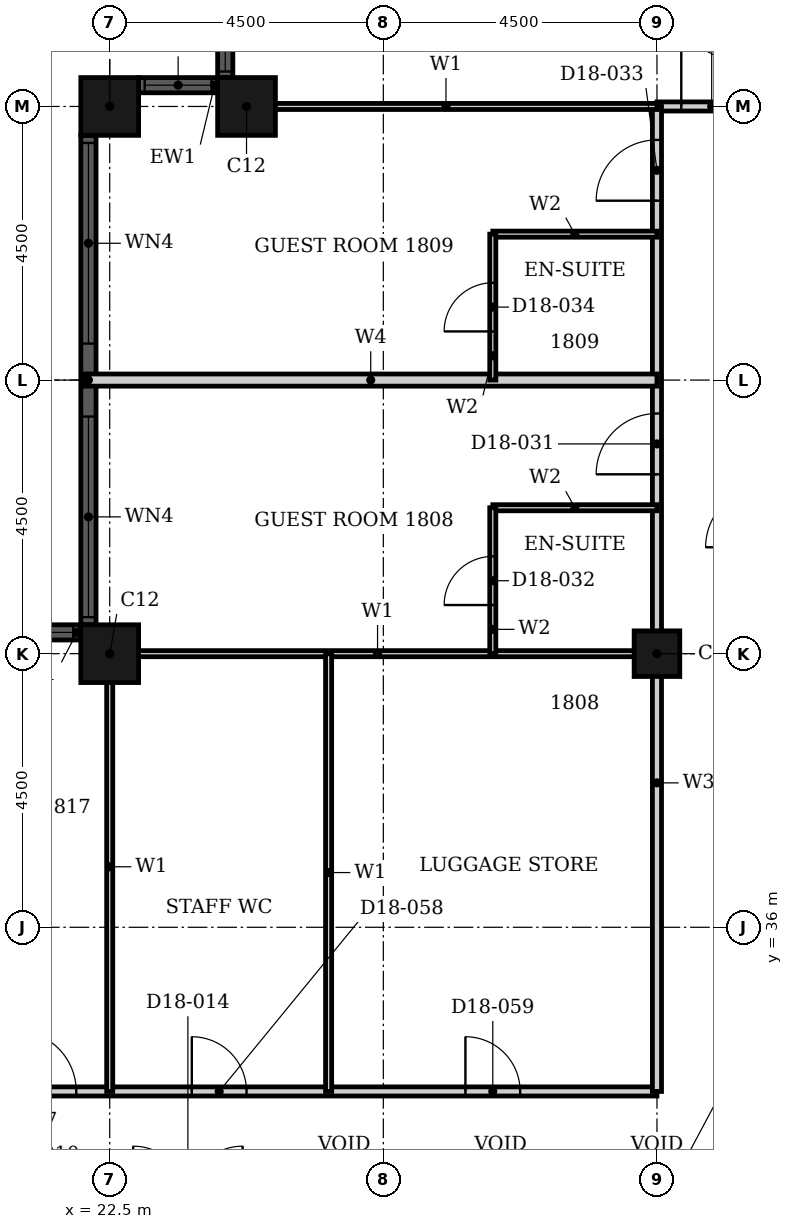
"""IFC4 building model, lengths in metres.
Left out: names, types, materials, properties, quantities, classifications, styles, units other than length and angle.
Written with IfcOpenShell. Run it as: python <this file> out.ifc"""

import sys

from ifc_helpers import new_model, si_unit, direction, frame, frame_2d, origin, origin_2d, place, context, subcontext, project, spatial, rectangle, hollow_rectangle, extrude, element, fill, save


model = new_model("IFC4")
c1 = context("Model", 3, precision=1e-05, world=origin(), true_north=direction((0.0, 1.0)))
c2 = subcontext(c1, "Body", "Model", "MODEL_VIEW")
j1 = project(units=[si_unit("LENGTHUNIT", "METRE"), si_unit("PLANEANGLEUNIT", "RADIAN")], contexts=[c1])
p1 = place(None, origin())
s1 = spatial("IfcSite", under=j1, at=p1, CompositionType="ELEMENT")
p2 = place(p1, origin())
s2 = spatial("IfcBuilding", under=s1, at=p2, CompositionType="ELEMENT")
p3 = place(p2, frame((0.0, 0.0, 78.0)))
s3 = spatial("IfcBuildingStorey", under=s2, at=p3, CompositionType="ELEMENT", Elevation=78.0)
for number, where, z_axis, x_axis in (
    (1, (24.75, 49.5, 0.0), (0.0, 0.0, 1.0), (1.0, 0.0, 0.0)),
    (2, (22.5, 49.5, 0.0), (0.0, 0.0, 1.0), (1.0, 0.0, 0.0)),
    (3, (22.5, 40.5, 0.0), (0.0, 0.0, 1.0), (1.0, 0.0, 0.0)),
):
    element("IfcColumn", number, at=place(p3, frame(where, z_axis=z_axis, x_axis=x_axis)), inside=s3, PredefinedType="COLUMN", context=c2, shape_type="SweptSolid", body=[
        extrude(hollow_rectangle(XDim=0.95, YDim=0.95, WallThickness=0.03, at=origin_2d()), origin(), (0.0, 0.0, 1.0), 3.6),
    ])
p4 = place(p3, frame((31.5, 40.5, 0.0), z_axis=(0.0, 0.0, 1.0), x_axis=(1.0, 0.0, 0.0)))
e4 = element("IfcColumn", 4, at=p4, inside=s3, PredefinedType="COLUMN", context=c2, shape_type="SweptSolid", body=[
    extrude(hollow_rectangle(XDim=0.75, YDim=0.75, WallThickness=0.024, at=origin_2d()), origin(), (0.0, 0.0, 1.0), 3.6),
])
p5 = place(p3, frame((24.4, 51.275, 0.0), z_axis=(0.0, 0.0, 1.0), x_axis=(0.0, -1.0, 0.0)))
e5 = element("IfcWall", 5, at=p5, inside=s3, PredefinedType="SOLIDWALL", context=c2, shape_type="SweptSolid", body=[
    extrude(rectangle(XDim=1.3, YDim=0.25, at=frame_2d((0.65, 0.0))), origin(), (0.0, 0.0, 1.0), 3.6),
])
p6 = place(p5, frame((0.1, 0.0, 0.9)))
e6 = element("IfcOpeningElement", 6, at=p6, cuts=e5, PredefinedType="OPENING", context=c2, shape_type="SweptSolid", body=[
    extrude(rectangle(XDim=1.1, YDim=2.08, at=frame_2d((0.55, 1.04))), frame((0.0, 0.135, 0.0), z_axis=(0.0, -1.0, 0.0), x_axis=(1.0, 0.0, 0.0)), (0.0, 0.0, 1.0), 0.27),
])
p7 = place(p3, frame((24.275, 49.85, 0.0), z_axis=(0.0, 0.0, 1.0), x_axis=(-1.0, 0.0, 0.0)))
e7 = element("IfcWall", 7, at=p7, inside=s3, PredefinedType="SOLIDWALL", context=c2, shape_type="SweptSolid", body=[
    extrude(rectangle(XDim=1.3, YDim=0.25, at=frame_2d((0.65, 0.0))), origin(), (0.0, 0.0, 1.0), 3.6),
])
p8 = place(p7, frame((0.1, 0.0, 0.9)))
e8 = element("IfcOpeningElement", 8, at=p8, cuts=e7, PredefinedType="OPENING", context=c2, shape_type="SweptSolid", body=[
    extrude(rectangle(XDim=1.1, YDim=2.08, at=frame_2d((0.55, 1.04))), frame((0.0, 0.135, 0.0), z_axis=(0.0, -1.0, 0.0), x_axis=(1.0, 0.0, 0.0)), (0.0, 0.0, 1.0), 0.27),
])
p9 = place(p3, frame((22.15, 49.025, 0.0), z_axis=(0.0, 0.0, 1.0), x_axis=(0.0, -1.0, 0.0)))
e9 = element("IfcWall", 9, at=p9, inside=s3, PredefinedType="SOLIDWALL", context=c2, shape_type="SweptSolid", body=[
    extrude(rectangle(XDim=8.05, YDim=0.25, at=frame_2d((4.025, 0.0))), origin(), (0.0, 0.0, 1.0), 3.6),
])
p10 = place(p9, frame((0.125, 0.0, 0.9)))
e10 = element("IfcOpeningElement", 10, at=p10, cuts=e9, PredefinedType="OPENING", context=c2, shape_type="SweptSolid", body=[
    extrude(rectangle(XDim=3.3, YDim=2.08, at=frame_2d((1.65, 1.04))), frame((0.0, 0.135, 0.0), z_axis=(0.0, -1.0, 0.0), x_axis=(1.0, 0.0, 0.0)), (0.0, 0.0, 1.0), 0.27),
])
p11 = place(p9, frame((4.625, 0.0, 0.9)))
e11 = element("IfcOpeningElement", 11, at=p11, cuts=e9, PredefinedType="OPENING", context=c2, shape_type="SweptSolid", body=[
    extrude(rectangle(XDim=3.3, YDim=2.08, at=frame_2d((1.65, 1.04))), frame((0.0, 0.135, 0.0), z_axis=(0.0, -1.0, 0.0), x_axis=(1.0, 0.0, 0.0)), (0.0, 0.0, 1.0), 0.27),
])
p12 = place(p3, frame((22.025, 40.85, 0.0), z_axis=(0.0, 0.0, 1.0), x_axis=(-1.0, 0.0, 0.0)))
e12 = element("IfcWall", 12, at=p12, inside=s3, PredefinedType="SOLIDWALL", context=c2, shape_type="SweptSolid", body=[
    extrude(rectangle(XDim=3.55, YDim=0.25, at=frame_2d((1.775, 0.0))), origin(), (0.0, 0.0, 1.0), 3.6),
])
p13 = place(p12, frame((0.125, 0.0, 0.9)))
e13 = element("IfcOpeningElement", 13, at=p13, cuts=e12, PredefinedType="OPENING", context=c2, shape_type="SweptSolid", body=[
    extrude(rectangle(XDim=3.3, YDim=2.08, at=frame_2d((1.65, 1.04))), frame((0.0, 0.135, 0.0), z_axis=(0.0, -1.0, 0.0), x_axis=(1.0, 0.0, 0.0)), (0.0, 0.0, 1.0), 0.27),
])
p14 = place(p3, frame((16.2, 33.3, 0.0), z_axis=(0.0, 0.0, 1.0), x_axis=(1.0, 0.0, 0.0)))
e14 = element("IfcWall", 14, at=p14, inside=s3, PredefinedType="PARTITIONING", context=c2, shape_type="SweptSolid", body=[
    extrude(rectangle(XDim=15.3, YDim=0.15, at=frame_2d((7.65, 0.0))), origin(), (0.0, 0.0, 1.0), 3.3),
])
p15 = place(p14, frame((4.75, 0.0, 0.0)))
e15 = element("IfcOpeningElement", 15, at=p15, cuts=e14, PredefinedType="OPENING", context=c2, shape_type="SweptSolid", body=[
    extrude(rectangle(XDim=1.0, YDim=2.1, at=frame_2d((0.5, 1.05))), frame((0.0, 0.085, 0.0), z_axis=(0.0, -1.0, 0.0), x_axis=(1.0, 0.0, 0.0)), (0.0, 0.0, 1.0), 0.17),
])
p16 = place(p14, frame((7.65, 0.0, 0.0)))
e16 = element("IfcOpeningElement", 16, at=p16, cuts=e14, PredefinedType="OPENING", context=c2, shape_type="SweptSolid", body=[
    extrude(rectangle(XDim=0.9, YDim=2.1, at=frame_2d((0.45, 1.05))), frame((0.0, 0.085, 0.0), z_axis=(0.0, -1.0, 0.0), x_axis=(1.0, 0.0, 0.0)), (0.0, 0.0, 1.0), 0.17),
])
p17 = place(p14, frame((12.15, 0.0, 0.0)))
e17 = element("IfcOpeningElement", 17, at=p17, cuts=e14, PredefinedType="OPENING", context=c2, shape_type="SweptSolid", body=[
    extrude(rectangle(XDim=0.9, YDim=2.1, at=frame_2d((0.45, 1.05))), frame((0.0, 0.085, 0.0), z_axis=(0.0, -1.0, 0.0), x_axis=(1.0, 0.0, 0.0)), (0.0, 0.0, 1.0), 0.17),
])
p18 = place(p3, frame((31.5, 49.5, 0.0), z_axis=(0.0, 0.0, 1.0), x_axis=(1.0, 0.0, 0.0)))
e18 = element("IfcWall", 18, at=p18, inside=s3, PredefinedType="PARTITIONING", context=c2, shape_type="SweptSolid", body=[
    extrude(rectangle(XDim=1.8, YDim=0.15, at=frame_2d((0.9, 0.0))), origin(), (0.0, 0.0, 1.0), 3.3),
])
p19 = place(p18, frame((0.4, 0.0, 0.0)))
e19 = element("IfcOpeningElement", 19, at=p19, cuts=e18, PredefinedType="OPENING", context=c2, shape_type="SweptSolid", body=[
    extrude(rectangle(XDim=1.0, YDim=2.1, at=frame_2d((0.5, 1.05))), frame((0.0, 0.085, 0.0), z_axis=(0.0, -1.0, 0.0), x_axis=(1.0, 0.0, 0.0)), (0.0, 0.0, 1.0), 0.17),
])
p20 = place(p3, frame((31.5, 33.3, 0.0), z_axis=(0.0, 0.0, 1.0), x_axis=(0.0, 1.0, 0.0)))
e20 = element("IfcWall", 20, at=p20, inside=s3, PredefinedType="PARTITIONING", context=c2, shape_type="SweptSolid", body=[
    extrude(rectangle(XDim=16.2, YDim=0.15, at=frame_2d((8.1, 0.0))), origin(), (0.0, 0.0, 1.0), 2.58),
])
p21 = place(p20, frame((10.15, 0.0, 0.0)))
e21 = element("IfcOpeningElement", 21, at=p21, cuts=e20, PredefinedType="OPENING", context=c2, shape_type="SweptSolid", body=[
    extrude(rectangle(XDim=1.0, YDim=2.1, at=frame_2d((0.5, 1.05))), frame((0.0, 0.085, 0.0), z_axis=(0.0, -1.0, 0.0), x_axis=(1.0, 0.0, 0.0)), (0.0, 0.0, 1.0), 0.17),
])
p22 = place(p20, frame((14.65, 0.0, 0.0)))
e22 = element("IfcOpeningElement", 22, at=p22, cuts=e20, PredefinedType="OPENING", context=c2, shape_type="SweptSolid", body=[
    extrude(rectangle(XDim=1.0, YDim=2.1, at=frame_2d((0.5, 1.05))), frame((0.0, 0.085, 0.0), z_axis=(0.0, -1.0, 0.0), x_axis=(1.0, 0.0, 0.0)), (0.0, 0.0, 1.0), 0.17),
])
p23 = place(p3, frame((22.31, 40.5, 0.0), z_axis=(0.0, 0.0, 1.0), x_axis=(1.0, 0.0, 0.0)))
e23 = element("IfcWall", 23, at=p23, inside=s3, PredefinedType="PARTITIONING", context=c2, shape_type="SweptSolid", body=[
    extrude(rectangle(XDim=9.19, YDim=0.1, at=frame_2d((4.595, 0.0))), origin(), (0.0, 0.0, 1.0), 2.38),
])
p24 = place(p3, frame((24.56, 49.5, 0.0), z_axis=(0.0, 0.0, 1.0), x_axis=(1.0, 0.0, 0.0)))
e24 = element("IfcWall", 24, at=p24, inside=s3, PredefinedType="PARTITIONING", context=c2, shape_type="SweptSolid", body=[
    extrude(rectangle(XDim=6.94, YDim=0.1, at=frame_2d((3.47, 0.0))), origin(), (0.0, 0.0, 1.0), 3.3),
])
p25 = place(p3, frame((22.5, 33.3, 0.0), z_axis=(0.0, 0.0, 1.0), x_axis=(0.0, 1.0, 0.0)))
e25 = element("IfcWall", 25, at=p25, inside=s3, PredefinedType="PARTITIONING", context=c2, shape_type="SweptSolid", body=[
    extrude(rectangle(XDim=7.39, YDim=0.1, at=frame_2d((3.695, 0.0))), origin(), (0.0, 0.0, 1.0), 3.3),
])
p26 = place(p3, frame((26.1, 33.3, 0.0), z_axis=(0.0, 0.0, 1.0), x_axis=(0.0, 1.0, 0.0)))
e26 = element("IfcWall", 26, at=p26, inside=s3, PredefinedType="PARTITIONING", context=c2, shape_type="SweptSolid", body=[
    extrude(rectangle(XDim=7.2, YDim=0.1, at=frame_2d((3.6, 0.0))), origin(), (0.0, 0.0, 1.0), 3.3),
])
p27 = place(p3, frame((22.085, 45.0, 0.0), z_axis=(0.0, 0.0, 1.0), x_axis=(1.0, 0.0, 0.0)))
e27 = element("IfcWall", 27, at=p27, inside=s3, PredefinedType="PARTITIONING", context=c2, shape_type="SweptSolid", body=[
    extrude(rectangle(XDim=9.415, YDim=0.2, at=frame_2d((4.708, 0.0))), origin(), (0.0, 0.0, 1.0), 3.3),
])
for number, where, z_axis, x_axis in (
    (28, (28.8, 42.9, 0.0), (0.0, 0.0, 1.0), (1.0, 0.0, 0.0)),
    (29, (28.8, 47.4, 0.0), (0.0, 0.0, 1.0), (1.0, 0.0, 0.0)),
):
    element("IfcWall", number, at=place(p3, frame(where, z_axis=z_axis, x_axis=x_axis)), inside=s3, PredefinedType="PARTITIONING", context=c2, shape_type="SweptSolid", body=[
        extrude(rectangle(XDim=2.7, YDim=0.1, at=frame_2d((1.35, 0.0))), origin(), (0.0, 0.0, 1.0), 3.3),
    ])
p28 = place(p3, frame((28.8, 40.5, 0.0), z_axis=(0.0, 0.0, 1.0), x_axis=(0.0, 1.0, 0.0)))
e30 = element("IfcWall", 30, at=p28, inside=s3, PredefinedType="PARTITIONING", context=c2, shape_type="SweptSolid", body=[
    extrude(rectangle(XDim=2.4, YDim=0.1, at=frame_2d((1.2, 0.0))), origin(), (0.0, 0.0, 1.0), 3.3),
])
p29 = place(p28, frame((0.8, 0.0, 0.0)))
e31 = element("IfcOpeningElement", 31, at=p29, cuts=e30, PredefinedType="OPENING", context=c2, shape_type="SweptSolid", body=[
    extrude(rectangle(XDim=0.8, YDim=2.1, at=frame_2d((0.4, 1.05))), frame((0.0, 0.06, 0.0), z_axis=(0.0, -1.0, 0.0), x_axis=(1.0, 0.0, 0.0)), (0.0, 0.0, 1.0), 0.12),
])
p30 = place(p3, frame((28.8, 45.0, 0.0), z_axis=(0.0, 0.0, 1.0), x_axis=(0.0, 1.0, 0.0)))
e32 = element("IfcWall", 32, at=p30, inside=s3, PredefinedType="PARTITIONING", context=c2, shape_type="SweptSolid", body=[
    extrude(rectangle(XDim=2.4, YDim=0.1, at=frame_2d((1.2, 0.0))), origin(), (0.0, 0.0, 1.0), 3.3),
])
p31 = place(p30, frame((0.8, 0.0, 0.0)))
e33 = element("IfcOpeningElement", 33, at=p31, cuts=e32, PredefinedType="OPENING", context=c2, shape_type="SweptSolid", body=[
    extrude(rectangle(XDim=0.8, YDim=2.1, at=frame_2d((0.4, 1.05))), frame((0.0, 0.06, 0.0), z_axis=(0.0, -1.0, 0.0), x_axis=(1.0, 0.0, 0.0)), (0.0, 0.0, 1.0), 0.12),
])
p32 = place(p6, origin())
e34 = element("IfcWindow", 34, at=p32, inside=s3, PartitioningType="SINGLE_PANEL", PredefinedType="WINDOW", context=c2, shape_type="SweptSolid", body=[
    extrude(rectangle(XDim=1.1, YDim=2.08, at=frame_2d((0.55, 1.04))), frame((0.0, 0.03, 0.0), z_axis=(0.0, -1.0, 0.0), x_axis=(1.0, 0.0, 0.0)), (0.0, 0.0, 1.0), 0.06),
])
fill(e6, e34)
p33 = place(p8, origin())
e35 = element("IfcWindow", 35, at=p33, inside=s3, PartitioningType="SINGLE_PANEL", PredefinedType="WINDOW", context=c2, shape_type="SweptSolid", body=[
    extrude(rectangle(XDim=1.1, YDim=2.08, at=frame_2d((0.55, 1.04))), frame((0.0, 0.03, 0.0), z_axis=(0.0, -1.0, 0.0), x_axis=(1.0, 0.0, 0.0)), (0.0, 0.0, 1.0), 0.06),
])
fill(e8, e35)
p34 = place(p10, origin())
e36 = element("IfcWindow", 36, at=p34, inside=s3, PartitioningType="SINGLE_PANEL", PredefinedType="WINDOW", context=c2, shape_type="SweptSolid", body=[
    extrude(rectangle(XDim=3.3, YDim=2.08, at=frame_2d((1.65, 1.04))), frame((0.0, 0.03, 0.0), z_axis=(0.0, -1.0, 0.0), x_axis=(1.0, 0.0, 0.0)), (0.0, 0.0, 1.0), 0.06),
])
fill(e10, e36)
p35 = place(p11, origin())
e37 = element("IfcWindow", 37, at=p35, inside=s3, PartitioningType="SINGLE_PANEL", PredefinedType="WINDOW", context=c2, shape_type="SweptSolid", body=[
    extrude(rectangle(XDim=3.3, YDim=2.08, at=frame_2d((1.65, 1.04))), frame((0.0, 0.03, 0.0), z_axis=(0.0, -1.0, 0.0), x_axis=(1.0, 0.0, 0.0)), (0.0, 0.0, 1.0), 0.06),
])
fill(e11, e37)
p36 = place(p13, origin())
e38 = element("IfcWindow", 38, at=p36, inside=s3, PartitioningType="SINGLE_PANEL", PredefinedType="WINDOW", context=c2, shape_type="SweptSolid", body=[
    extrude(rectangle(XDim=3.3, YDim=2.08, at=frame_2d((1.65, 1.04))), frame((0.0, 0.03, 0.0), z_axis=(0.0, -1.0, 0.0), x_axis=(1.0, 0.0, 0.0)), (0.0, 0.0, 1.0), 0.06),
])
fill(e13, e38)
p37 = place(p21, origin())
e39 = element("IfcDoor", 39, at=p37, inside=s3, OperationType="SINGLE_SWING_RIGHT", PredefinedType="DOOR", context=c2, shape_type="SweptSolid", body=[
    extrude(rectangle(XDim=1.0, YDim=2.1, at=frame_2d((0.5, 1.05))), frame((0.0, 0.025, 0.0), z_axis=(0.0, -1.0, 0.0), x_axis=(1.0, 0.0, 0.0)), (0.0, 0.0, 1.0), 0.05),
])
fill(e21, e39)
p38 = place(p29, origin())
e40 = element("IfcDoor", 40, at=p38, inside=s3, OperationType="SINGLE_SWING_LEFT", PredefinedType="DOOR", context=c2, shape_type="SweptSolid", body=[
    extrude(rectangle(XDim=0.8, YDim=2.1, at=frame_2d((0.4, 1.05))), frame((0.0, 0.025, 0.0), z_axis=(0.0, -1.0, 0.0), x_axis=(1.0, 0.0, 0.0)), (0.0, 0.0, 1.0), 0.05),
])
fill(e31, e40)
p39 = place(p22, origin())
e41 = element("IfcDoor", 41, at=p39, inside=s3, OperationType="SINGLE_SWING_RIGHT", PredefinedType="DOOR", context=c2, shape_type="SweptSolid", body=[
    extrude(rectangle(XDim=1.0, YDim=2.1, at=frame_2d((0.5, 1.05))), frame((0.0, 0.025, 0.0), z_axis=(0.0, -1.0, 0.0), x_axis=(1.0, 0.0, 0.0)), (0.0, 0.0, 1.0), 0.05),
])
fill(e22, e41)
p40 = place(p31, origin())
e42 = element("IfcDoor", 42, at=p40, inside=s3, OperationType="SINGLE_SWING_LEFT", PredefinedType="DOOR", context=c2, shape_type="SweptSolid", body=[
    extrude(rectangle(XDim=0.8, YDim=2.1, at=frame_2d((0.4, 1.05))), frame((0.0, 0.025, 0.0), z_axis=(0.0, -1.0, 0.0), x_axis=(1.0, 0.0, 0.0)), (0.0, 0.0, 1.0), 0.05),
])
fill(e33, e42)
p41 = place(p19, origin())
e43 = element("IfcDoor", 43, at=p41, inside=s3, OperationType="SINGLE_SWING_RIGHT", PredefinedType="DOOR", context=c2, shape_type="SweptSolid", body=[
    extrude(rectangle(XDim=1.0, YDim=2.1, at=frame_2d((0.5, 1.05))), frame((0.0, 0.025, 0.0), z_axis=(0.0, -1.0, 0.0), x_axis=(1.0, 0.0, 0.0)), (0.0, 0.0, 1.0), 0.05),
])
fill(e19, e43)
p42 = place(p15, origin())
e44 = element("IfcDoor", 44, at=p42, inside=s3, OperationType="SINGLE_SWING_RIGHT", PredefinedType="DOOR", context=c2, shape_type="SweptSolid", body=[
    extrude(rectangle(XDim=1.0, YDim=2.1, at=frame_2d((0.5, 1.05))), frame((0.0, 0.025, 0.0), z_axis=(0.0, -1.0, 0.0), x_axis=(1.0, 0.0, 0.0)), (0.0, 0.0, 1.0), 0.05),
])
fill(e15, e44)
p43 = place(p16, origin())
e45 = element("IfcDoor", 45, at=p43, inside=s3, OperationType="SINGLE_SWING_RIGHT", PredefinedType="DOOR", context=c2, shape_type="SweptSolid", body=[
    extrude(rectangle(XDim=0.9, YDim=2.1, at=frame_2d((0.45, 1.05))), frame((0.0, 0.025, 0.0), z_axis=(0.0, -1.0, 0.0), x_axis=(1.0, 0.0, 0.0)), (0.0, 0.0, 1.0), 0.05),
])
fill(e16, e45)
p44 = place(p17, origin())
e46 = element("IfcDoor", 46, at=p44, inside=s3, OperationType="SINGLE_SWING_LEFT", PredefinedType="DOOR", context=c2, shape_type="SweptSolid", body=[
    extrude(rectangle(XDim=0.9, YDim=2.1, at=frame_2d((0.45, 1.05))), frame((0.0, 0.025, 0.0), z_axis=(0.0, -1.0, 0.0), x_axis=(1.0, 0.0, 0.0)), (0.0, 0.0, 1.0), 0.05),
])
fill(e17, e46)
save(model, sys.argv[1])
